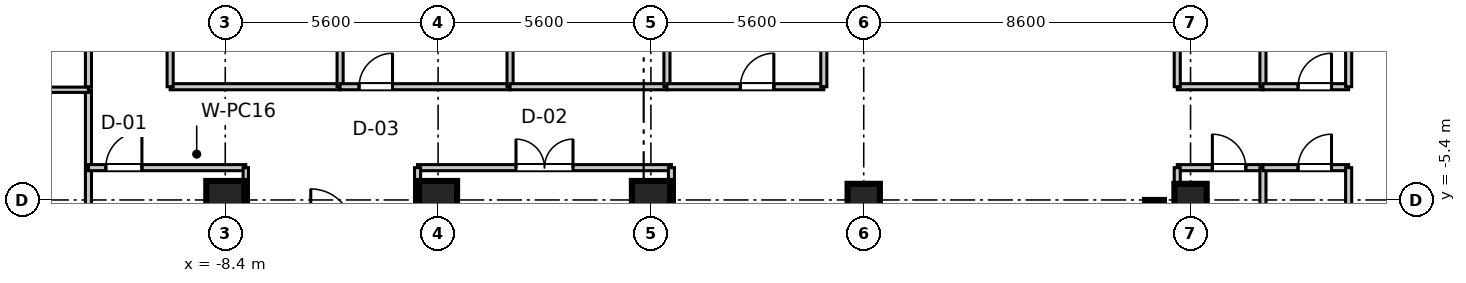
"""IFC4 building model, lengths in metres.
Left out: names, types, materials, properties, quantities, classifications, styles, units other than length and angle.
Written with IfcOpenShell. Run it as: python <this file> out.ifc"""

import sys

from ifc_helpers import new_model, si_unit, direction, frame, frame_2d, origin, origin_2d, place, context, subcontext, project, spatial, rectangle, extrude, source, transform, mapped, element, fill, save


model = new_model("IFC4")
c1 = context("Model", 3, precision=1e-05, world=origin(), true_north=direction((0.0, 1.0)))
c2 = subcontext(c1, "Body", "Model", "MODEL_VIEW")
j1 = project(units=[si_unit("LENGTHUNIT", "METRE"), si_unit("PLANEANGLEUNIT", "RADIAN")], contexts=[c1])
p1 = place(None, origin())
s1 = spatial("IfcSite", under=j1, at=p1, CompositionType="ELEMENT")
p2 = place(p1, origin())
s2 = spatial("IfcBuilding", under=s1, at=p2, CompositionType="ELEMENT")
p3 = place(p2, frame((0.0, 0.0, 212.3)))
s3 = spatial("IfcBuildingStorey", under=s2, at=p3, CompositionType="ELEMENT", Elevation=212.3)
m1 = source(origin(), c2, "Body", "SweptSolid", [
    extrude(rectangle(XDim=1.0, YDim=1.0, at=origin_2d()), origin(), (0.0, 0.0, 1.0), 3.655),
])
for number, where, z_axis, x_axis in (
    (1, (-8.4, -5.4, 0.0), (0.0, 0.0, 1.0), (1.0, 0.0, 0.0)),
    (2, (-2.8, -5.4, 0.0), (0.0, 0.0, 1.0), (1.0, 0.0, 0.0)),
    (3, (2.8, -5.4, 0.0), (0.0, 0.0, 1.0), (1.0, 0.0, 0.0)),
):
    element("IfcColumn", number, at=place(p3, frame(where, z_axis=z_axis, x_axis=x_axis)), inside=s3, PredefinedType="COLUMN", context=c2, shape_type="MappedRepresentation", body=[
        mapped(m1, transform((0.0, 0.0, 0.0), scale=1.0)),
    ])
m2 = source(origin(), c2, "Body", "SweptSolid", [
    extrude(rectangle(XDim=0.85, YDim=0.85, at=origin_2d()), origin(), (0.0, 0.0, 1.0), 3.655),
])
for number, where, z_axis, x_axis in (
    (4, (8.4, -5.4, 0.0), (0.0, 0.0, 1.0), (1.0, 0.0, 0.0)),
    (5, (17.0, -5.4, 0.0), (0.0, 0.0, 1.0), (1.0, 0.0, 0.0)),
):
    element("IfcColumn", number, at=place(p3, frame(where, z_axis=z_axis, x_axis=x_axis)), inside=s3, PredefinedType="PILASTER", context=c2, shape_type="MappedRepresentation", body=[
        mapped(m2, transform((0.0, 0.0, 0.0), scale=1.0)),
    ])
m3 = source(origin(), c2, "Body", "SweptSolid", [
    extrude(rectangle(XDim=11.6, YDim=0.5, at=frame_2d((5.8, 0.0))), origin(), (0.0, 0.0, 1.0), 3.41),
])
p4 = place(p3, frame((16.05, -17.0, 0.0), z_axis=(0.0, 0.0, 1.0), x_axis=(0.0, 1.0, 0.0)))
e6 = element("IfcWall", 6, at=p4, inside=s3, PredefinedType="SHEAR", context=c2, shape_type="MappedRepresentation", body=[
    mapped(m3, transform((0.0, 0.0, 0.0), scale=1.0)),
])
m4 = source(origin(), c2, "Body", "SweptSolid", [
    extrude(rectangle(XDim=2.255, YDim=0.16, at=frame_2d((1.127, 0.0))), origin(), (0.0, 0.0, 1.0), 2.75),
])
p5 = place(p3, frame((16.65, -4.55, 0.0), z_axis=(0.0, 0.0, 1.0), x_axis=(1.0, 0.0, 0.0)))
e7 = element("IfcWall", 7, at=p5, inside=s3, PredefinedType="PARTITIONING", context=c2, shape_type="MappedRepresentation", body=[
    mapped(m4, transform((0.0, 0.0, 0.0), scale=1.0)),
])
p6 = place(p5, frame((0.924, 0.0, 0.0)))
e8 = element("IfcOpeningElement", 8, at=p6, cuts=e7, PredefinedType="OPENING", context=c2, shape_type="SweptSolid", body=[
    extrude(rectangle(XDim=0.88, YDim=2.1, at=frame_2d((0.44, 1.05))), frame((0.0, 0.09, 0.0), z_axis=(0.0, -1.0, 0.0), x_axis=(1.0, 0.0, 0.0)), (0.0, 0.0, 1.0), 0.18),
])
m5 = source(origin(), c2, "Body", "SweptSolid", [
    extrude(rectangle(XDim=19.35, YDim=0.16, at=frame_2d((9.675, 0.0))), origin(), (0.0, 0.0, 1.0), 2.75),
])
for number, where, z_axis, x_axis in (
    (9, (16.65, -23.9, 0.0), (0.0, 0.0, 1.0), (0.0, 1.0, 0.0)),
    (10, (18.905, -23.9, 0.0), (0.0, 0.0, 1.0), (0.0, 1.0, 0.0)),
):
    element("IfcWall", number, at=place(p3, frame(where, z_axis=z_axis, x_axis=x_axis)), inside=s3, PredefinedType="PARTITIONING", context=c2, shape_type="MappedRepresentation", body=[
        mapped(m5, transform((0.0, 0.0, 0.0), scale=1.0)),
    ])
m6 = source(origin(), c2, "Body", "SweptSolid", [
    extrude(rectangle(XDim=2.255, YDim=0.16, at=frame_2d((1.127, 0.0))), origin(), (0.0, 0.0, 1.0), 2.75),
])
p7 = place(p3, frame((18.905, -4.55, 0.0), z_axis=(0.0, 0.0, 1.0), x_axis=(1.0, 0.0, 0.0)))
e11 = element("IfcWall", 11, at=p7, inside=s3, PredefinedType="PARTITIONING", context=c2, shape_type="MappedRepresentation", body=[
    mapped(m6, transform((0.0, 0.0, 0.0), scale=1.0)),
])
p8 = place(p7, frame((0.924, 0.0, 0.0)))
e12 = element("IfcOpeningElement", 12, at=p8, cuts=e11, PredefinedType="OPENING", context=c2, shape_type="SweptSolid", body=[
    extrude(rectangle(XDim=0.88, YDim=2.1, at=frame_2d((0.44, 1.05))), frame((0.0, 0.09, 0.0), z_axis=(0.0, -1.0, 0.0), x_axis=(1.0, 0.0, 0.0)), (0.0, 0.0, 1.0), 0.18),
])
m7 = source(origin(), c2, "Body", "SweptSolid", [
    extrude(rectangle(XDim=17.93, YDim=0.16, at=frame_2d((8.965, 0.0))), origin(), (0.0, 0.0, 1.0), 2.75),
])
p9 = place(p3, frame((21.16, -22.48, 0.0), z_axis=(0.0, 0.0, 1.0), x_axis=(0.0, 1.0, 0.0)))
e13 = element("IfcWall", 13, at=p9, inside=s3, PredefinedType="PARTITIONING", context=c2, shape_type="MappedRepresentation", body=[
    mapped(m7, transform((0.0, 0.0, 0.0), scale=1.0)),
])
m8 = source(origin(), c2, "Body", "SweptSolid", [
    extrude(rectangle(XDim=21.4, YDim=0.16, at=frame_2d((10.7, 0.0))), origin(), (0.0, 0.0, 1.0), 2.75),
])
p10 = place(p3, frame((-12.0, -23.9, 0.0), z_axis=(0.0, 0.0, 1.0), x_axis=(0.0, 1.0, 0.0)))
e14 = element("IfcWall", 14, at=p10, inside=s3, PredefinedType="PARTITIONING", context=c2, shape_type="MappedRepresentation", body=[
    mapped(m8, transform((0.0, 0.0, 0.0), scale=1.0)),
])
p11 = place(p10, frame((12.3, 0.0, 0.0)))
e15 = element("IfcOpeningElement", 15, at=p11, cuts=e14, PredefinedType="OPENING", context=c2, shape_type="SweptSolid", body=[
    extrude(rectangle(XDim=0.95, YDim=2.1, at=frame_2d((0.475, 1.05))), frame((0.0, 0.09, 0.0), z_axis=(0.0, -1.0, 0.0), x_axis=(1.0, 0.0, 0.0)), (0.0, 0.0, 1.0), 0.18),
])
m9 = source(origin(), c2, "Body", "SweptSolid", [
    extrude(rectangle(XDim=9.16, YDim=0.14, at=frame_2d((4.58, 0.0))), origin(), (0.0, 0.0, 1.0), 2.75),
])
p12 = place(p3, frame((-21.16, -2.5, 0.0), z_axis=(0.0, 0.0, 1.0), x_axis=(1.0, 0.0, 0.0)))
e16 = element("IfcWall", 16, at=p12, inside=s3, PredefinedType="PARTITIONING", context=c2, shape_type="MappedRepresentation", body=[
    mapped(m9, transform((0.0, 0.0, 0.0), scale=1.0)),
])
m10 = source(origin(), c2, "Body", "SweptSolid", [
    extrude(rectangle(XDim=4.14, YDim=0.16, at=frame_2d((2.07, 0.0))), origin(), (0.0, 0.0, 1.0), 2.75),
])
p13 = place(p3, frame((-12.0, -4.55, 0.0), z_axis=(0.0, 0.0, 1.0), x_axis=(1.0, 0.0, 0.0)))
e17 = element("IfcWall", 17, at=p13, inside=s3, PredefinedType="PARTITIONING", context=c2, shape_type="MappedRepresentation", body=[
    mapped(m10, transform((0.0, 0.0, 0.0), scale=1.0)),
])
p14 = place(p13, frame((0.457, 0.0, 0.0)))
e18 = element("IfcOpeningElement", 18, at=p14, cuts=e17, PredefinedType="OPENING", context=c2, shape_type="SweptSolid", body=[
    extrude(rectangle(XDim=0.95, YDim=2.1, at=frame_2d((0.475, 1.05))), frame((0.0, 0.09, 0.0), z_axis=(0.0, -1.0, 0.0), x_axis=(1.0, 0.0, 0.0)), (0.0, 0.0, 1.0), 0.18),
])
m11 = source(origin(), c2, "Body", "SweptSolid", [
    extrude(rectangle(XDim=19.35, YDim=0.14, at=frame_2d((9.675, 0.0))), origin(), (0.0, 0.0, 1.0), 2.75),
])
p15 = place(p3, frame((-7.86, -23.9, 0.0), z_axis=(0.0, 0.0, 1.0), x_axis=(0.0, 1.0, 0.0)))
e19 = element("IfcWall", 19, at=p15, inside=s3, PredefinedType="PARTITIONING", context=c2, shape_type="MappedRepresentation", body=[
    mapped(m11, transform((0.0, 0.0, 0.0), scale=1.0)),
])
m12 = source(origin(), c2, "Body", "SweptSolid", [
    extrude(rectangle(XDim=6.68, YDim=0.16, at=frame_2d((3.34, 0.0))), origin(), (0.0, 0.0, 1.0), 2.75),
])
p16 = place(p3, frame((-3.34, -4.55, 0.0), z_axis=(0.0, 0.0, 1.0), x_axis=(1.0, 0.0, 0.0)))
e20 = element("IfcWall", 20, at=p16, inside=s3, PredefinedType="PARTITIONING", context=c2, shape_type="MappedRepresentation", body=[
    mapped(m12, transform((0.0, 0.0, 0.0), scale=1.0)),
])
p17 = place(p16, frame((2.59, 0.0, 0.0)))
e21 = element("IfcOpeningElement", 21, at=p17, cuts=e20, PredefinedType="OPENING", context=c2, shape_type="SweptSolid", body=[
    extrude(rectangle(XDim=1.5, YDim=2.15, at=frame_2d((0.75, 1.075))), frame((0.0, 0.09, 0.0), z_axis=(0.0, -1.0, 0.0), x_axis=(1.0, 0.0, 0.0)), (0.0, 0.0, 1.0), 0.18),
])
for number, where, z_axis, x_axis in (
    (22, (-3.34, -23.9, 0.0), (0.0, 0.0, 1.0), (0.0, 1.0, 0.0)),
    (23, (3.34, -23.9, 0.0), (0.0, 0.0, 1.0), (0.0, 1.0, 0.0)),
):
    element("IfcWall", number, at=place(p3, frame(where, z_axis=z_axis, x_axis=x_axis)), inside=s3, PredefinedType="PARTITIONING", context=c2, shape_type="MappedRepresentation", body=[
        mapped(m5, transform((0.0, 0.0, 0.0), scale=1.0)),
    ])
m13 = source(origin(), c2, "Body", "SweptSolid", [
    extrude(rectangle(XDim=4.84, YDim=0.16, at=frame_2d((2.42, 0.0))), origin(), (0.0, 0.0, 1.0), 2.75),
])
p18 = place(p3, frame((-12.0, -2.42, 0.0), z_axis=(0.0, 0.0, 1.0), x_axis=(0.0, 1.0, 0.0)))
e24 = element("IfcWall", 24, at=p18, inside=s3, PredefinedType="PARTITIONING", context=c2, shape_type="MappedRepresentation", body=[
    mapped(m13, transform((0.0, 0.0, 0.0), scale=1.0)),
])
p19 = place(p18, frame((1.945, 0.0, 0.0)))
e25 = element("IfcOpeningElement", 25, at=p19, cuts=e24, PredefinedType="OPENING", context=c2, shape_type="SweptSolid", body=[
    extrude(rectangle(XDim=0.95, YDim=2.1, at=frame_2d((0.475, 1.05))), frame((0.0, 0.09, 0.0), z_axis=(0.0, -1.0, 0.0), x_axis=(1.0, 0.0, 0.0)), (0.0, 0.0, 1.0), 0.18),
])
m14 = source(origin(), c2, "Body", "SweptSolid", [
    extrude(rectangle(XDim=4.472, YDim=0.16, at=frame_2d((2.236, 0.0))), origin(), (0.0, 0.0, 1.0), 2.75),
])
p20 = place(p3, frame((-9.85, -2.42, 0.0), z_axis=(0.0, 0.0, 1.0), x_axis=(1.0, 0.0, 0.0)))
e26 = element("IfcWall", 26, at=p20, inside=s3, PredefinedType="PARTITIONING", context=c2, shape_type="MappedRepresentation", body=[
    mapped(m14, transform((0.0, 0.0, 0.0), scale=1.0)),
])
for number, where, z_axis, x_axis in (
    (27, (-9.85, -2.42, 0.0), (0.0, 0.0, 1.0), (0.0, 1.0, 0.0)),
    (28, (-5.378, -2.42, 0.0), (0.0, 0.0, 1.0), (0.0, 1.0, 0.0)),
):
    element("IfcWall", number, at=place(p3, frame(where, z_axis=z_axis, x_axis=x_axis)), inside=s3, PredefinedType="PARTITIONING", context=c2, shape_type="MappedRepresentation", body=[
        mapped(m13, transform((0.0, 0.0, 0.0), scale=1.0)),
    ])
m15 = source(origin(), c2, "Body", "SweptSolid", [
    extrude(rectangle(XDim=4.472, YDim=0.16, at=frame_2d((2.236, 0.0))), origin(), (0.0, 0.0, 1.0), 2.75),
])
p21 = place(p3, frame((-5.378, -2.42, 0.0), z_axis=(0.0, 0.0, 1.0), x_axis=(1.0, 0.0, 0.0)))
e29 = element("IfcWall", 29, at=p21, inside=s3, PredefinedType="PARTITIONING", context=c2, shape_type="MappedRepresentation", body=[
    mapped(m15, transform((0.0, 0.0, 0.0), scale=1.0)),
])
p22 = place(p21, frame((0.499, 0.0, 0.0)))
e30 = element("IfcOpeningElement", 30, at=p22, cuts=e29, PredefinedType="OPENING", context=c2, shape_type="SweptSolid", body=[
    extrude(rectangle(XDim=0.88, YDim=2.1, at=frame_2d((0.44, 1.05))), frame((0.0, 0.09, 0.0), z_axis=(0.0, -1.0, 0.0), x_axis=(1.0, 0.0, 0.0)), (0.0, 0.0, 1.0), 0.18),
])
p23 = place(p3, frame((-0.906, -2.42, 0.0), z_axis=(0.0, 0.0, 1.0), x_axis=(0.0, 1.0, 0.0)))
e31 = element("IfcWall", 31, at=p23, inside=s3, PredefinedType="PARTITIONING", context=c2, shape_type="MappedRepresentation", body=[
    mapped(m13, transform((0.0, 0.0, 0.0), scale=1.0)),
])
m16 = source(origin(), c2, "Body", "SweptSolid", [
    extrude(rectangle(XDim=4.128, YDim=0.16, at=frame_2d((2.064, 0.0))), origin(), (0.0, 0.0, 1.0), 2.75),
])
p24 = place(p3, frame((-0.906, -2.42, 0.0), z_axis=(0.0, 0.0, 1.0), x_axis=(1.0, 0.0, 0.0)))
e32 = element("IfcWall", 32, at=p24, inside=s3, PredefinedType="PARTITIONING", context=c2, shape_type="MappedRepresentation", body=[
    mapped(m16, transform((0.0, 0.0, 0.0), scale=1.0)),
])
p25 = place(p3, frame((3.222, -2.42, 0.0), z_axis=(0.0, 0.0, 1.0), x_axis=(0.0, 1.0, 0.0)))
e33 = element("IfcWall", 33, at=p25, inside=s3, PredefinedType="PARTITIONING", context=c2, shape_type="MappedRepresentation", body=[
    mapped(m13, transform((0.0, 0.0, 0.0), scale=1.0)),
])
m17 = source(origin(), c2, "Body", "SweptSolid", [
    extrude(rectangle(XDim=4.128, YDim=0.16, at=frame_2d((2.064, 0.0))), origin(), (0.0, 0.0, 1.0), 2.75),
])
p26 = place(p3, frame((3.222, -2.42, 0.0), z_axis=(0.0, 0.0, 1.0), x_axis=(1.0, 0.0, 0.0)))
e34 = element("IfcWall", 34, at=p26, inside=s3, PredefinedType="PARTITIONING", context=c2, shape_type="MappedRepresentation", body=[
    mapped(m17, transform((0.0, 0.0, 0.0), scale=1.0)),
])
p27 = place(p26, frame((1.933, 0.0, 0.0)))
e35 = element("IfcOpeningElement", 35, at=p27, cuts=e34, PredefinedType="OPENING", context=c2, shape_type="SweptSolid", body=[
    extrude(rectangle(XDim=0.88, YDim=2.1, at=frame_2d((0.44, 1.05))), frame((0.0, 0.09, 0.0), z_axis=(0.0, -1.0, 0.0), x_axis=(1.0, 0.0, 0.0)), (0.0, 0.0, 1.0), 0.18),
])
p28 = place(p3, frame((7.35, -2.42, 0.0), z_axis=(0.0, 0.0, 1.0), x_axis=(0.0, 1.0, 0.0)))
e36 = element("IfcWall", 36, at=p28, inside=s3, PredefinedType="PARTITIONING", context=c2, shape_type="MappedRepresentation", body=[
    mapped(m13, transform((0.0, 0.0, 0.0), scale=1.0)),
])
p29 = place(p3, frame((16.65, -2.42, 0.0), z_axis=(0.0, 0.0, 1.0), x_axis=(1.0, 0.0, 0.0)))
e37 = element("IfcWall", 37, at=p29, inside=s3, PredefinedType="PARTITIONING", context=c2, shape_type="MappedRepresentation", body=[
    mapped(m4, transform((0.0, 0.0, 0.0), scale=1.0)),
])
for number, where, z_axis, x_axis in (
    (38, (16.65, -2.42, 0.0), (0.0, 0.0, 1.0), (0.0, 1.0, 0.0)),
    (39, (18.905, -2.42, 0.0), (0.0, 0.0, 1.0), (0.0, 1.0, 0.0)),
):
    element("IfcWall", number, at=place(p3, frame(where, z_axis=z_axis, x_axis=x_axis)), inside=s3, PredefinedType="PARTITIONING", context=c2, shape_type="MappedRepresentation", body=[
        mapped(m13, transform((0.0, 0.0, 0.0), scale=1.0)),
    ])
p30 = place(p3, frame((18.905, -2.42, 0.0), z_axis=(0.0, 0.0, 1.0), x_axis=(1.0, 0.0, 0.0)))
e40 = element("IfcWall", 40, at=p30, inside=s3, PredefinedType="PARTITIONING", context=c2, shape_type="MappedRepresentation", body=[
    mapped(m6, transform((0.0, 0.0, 0.0), scale=1.0)),
])
p31 = place(p30, frame((0.924, 0.0, 0.0)))
e41 = element("IfcOpeningElement", 41, at=p31, cuts=e40, PredefinedType="OPENING", context=c2, shape_type="SweptSolid", body=[
    extrude(rectangle(XDim=0.88, YDim=2.1, at=frame_2d((0.44, 1.05))), frame((0.0, 0.09, 0.0), z_axis=(0.0, -1.0, 0.0), x_axis=(1.0, 0.0, 0.0)), (0.0, 0.0, 1.0), 0.18),
])
p32 = place(p3, frame((21.16, -2.42, 0.0), z_axis=(0.0, 0.0, 1.0), x_axis=(0.0, 1.0, 0.0)))
e42 = element("IfcWall", 42, at=p32, inside=s3, PredefinedType="PARTITIONING", context=c2, shape_type="MappedRepresentation", body=[
    mapped(m13, transform((0.0, 0.0, 0.0), scale=1.0)),
])
m18 = source(origin(), c2, "Body", "SweptSolid", [
    extrude(rectangle(XDim=0.88, YDim=2.1, at=frame_2d((0.44, 1.05))), frame((0.0, 0.025, 0.0), z_axis=(0.0, -1.0, 0.0), x_axis=(1.0, 0.0, 0.0)), (0.0, 0.0, 1.0), 0.05),
])
p33 = place(p6, frame((0.88, 0.0, 0.0), z_axis=(0.0, 0.0, 1.0), x_axis=(-1.0, 0.0, 0.0)))
e43 = element("IfcDoor", 43, at=p33, inside=s3, OperationType="SINGLE_SWING_LEFT", PredefinedType="DOOR", context=c2, shape_type="MappedRepresentation", body=[
    mapped(m18, transform((0.0, 0.0, 0.0), scale=1.0)),
])
fill(e8, e43)
p34 = place(p8, frame((0.88, 0.0, 0.0), z_axis=(0.0, 0.0, 1.0), x_axis=(-1.0, 0.0, 0.0)))
e44 = element("IfcDoor", 44, at=p34, inside=s3, OperationType="SINGLE_SWING_RIGHT", PredefinedType="DOOR", context=c2, shape_type="MappedRepresentation", body=[
    mapped(m18, transform((0.0, 0.0, 0.0), scale=1.0)),
])
fill(e12, e44)
m19 = source(origin(), c2, "Body", "SweptSolid", [
    extrude(rectangle(XDim=0.95, YDim=2.1, at=frame_2d((0.475, 1.05))), frame((0.0, 0.025, 0.0), z_axis=(0.0, -1.0, 0.0), x_axis=(1.0, 0.0, 0.0)), (0.0, 0.0, 1.0), 0.05),
])
p35 = place(p14, frame((0.95, 0.0, 0.0), z_axis=(0.0, 0.0, 1.0), x_axis=(-1.0, 0.0, 0.0)))
e45 = element("IfcDoor", 45, at=p35, inside=s3, OperationType="SINGLE_SWING_RIGHT", PredefinedType="DOOR", context=c2, shape_type="MappedRepresentation", body=[
    mapped(m19, transform((0.0, 0.0, 0.0), scale=1.0)),
])
fill(e18, e45)
m20 = source(origin(), c2, "Body", "SweptSolid", [
    extrude(rectangle(XDim=1.5, YDim=2.15, at=frame_2d((0.75, 1.075))), frame((0.0, 0.025, 0.0), z_axis=(0.0, -1.0, 0.0), x_axis=(1.0, 0.0, 0.0)), (0.0, 0.0, 1.0), 0.05),
])
p36 = place(p17, frame((1.5, 0.0, 0.0), z_axis=(0.0, 0.0, 1.0), x_axis=(-1.0, 0.0, 0.0)))
e46 = element("IfcDoor", 46, at=p36, inside=s3, OperationType="DOUBLE_DOOR_SINGLE_SWING", PredefinedType="DOOR", context=c2, shape_type="MappedRepresentation", body=[
    mapped(m20, transform((0.0, 0.0, 0.0), scale=1.0)),
])
fill(e21, e46)
p37 = place(p22, origin())
e47 = element("IfcDoor", 47, at=p37, inside=s3, OperationType="SINGLE_SWING_RIGHT", PredefinedType="DOOR", context=c2, shape_type="MappedRepresentation", body=[
    mapped(m18, transform((0.0, 0.0, 0.0), scale=1.0)),
])
fill(e30, e47)
p38 = place(p27, origin())
e48 = element("IfcDoor", 48, at=p38, inside=s3, OperationType="SINGLE_SWING_RIGHT", PredefinedType="DOOR", context=c2, shape_type="MappedRepresentation", body=[
    mapped(m18, transform((0.0, 0.0, 0.0), scale=1.0)),
])
fill(e35, e48)
p39 = place(p31, origin())
e49 = element("IfcDoor", 49, at=p39, inside=s3, OperationType="SINGLE_SWING_RIGHT", PredefinedType="DOOR", context=c2, shape_type="MappedRepresentation", body=[
    mapped(m18, transform((0.0, 0.0, 0.0), scale=1.0)),
])
fill(e41, e49)
save(model, sys.argv[1])
